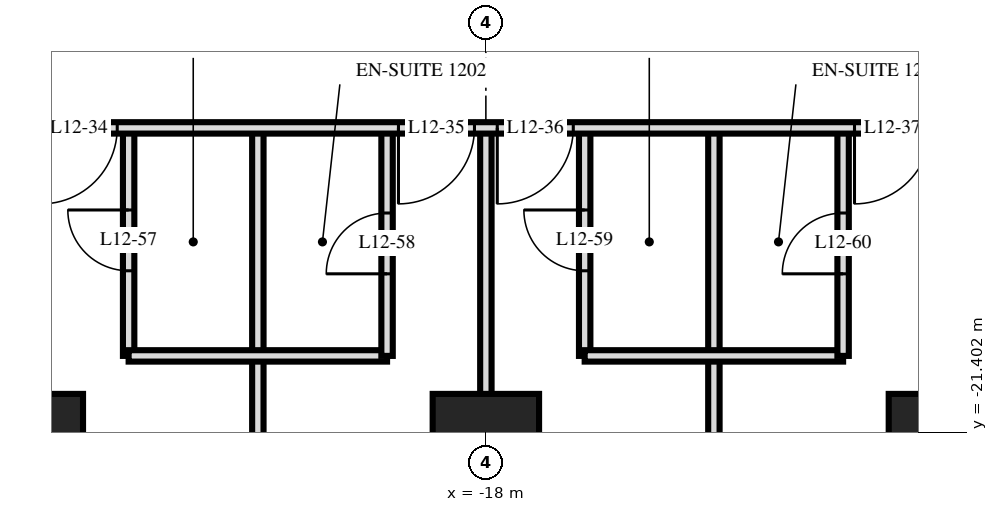
"""IFC4 building model, lengths in metres.
Left out: names, types, materials, properties, quantities, classifications, styles, units other than length and angle.
Written with IfcOpenShell. Run it as: python <this file> out.ifc"""

import sys

from ifc_helpers import new_model, si_unit, direction, frame, frame_2d, origin, origin_2d, place, context, subcontext, project, spatial, rectangle, extrude, element, fill, save


model = new_model("IFC4")
c1 = context("Model", 3, precision=1e-05, world=origin(), true_north=direction((0.0, 1.0)))
c2 = subcontext(c1, "Body", "Model", "MODEL_VIEW")
j1 = project(units=[si_unit("LENGTHUNIT", "METRE"), si_unit("PLANEANGLEUNIT", "RADIAN")], contexts=[c1])
p1 = place(None, origin())
s1 = spatial("IfcSite", under=j1, at=p1, CompositionType="ELEMENT")
p2 = place(p1, origin())
s2 = spatial("IfcBuilding", under=s1, at=p2, CompositionType="ELEMENT")
p3 = place(p2, frame((0.0, 0.0, 52.8)))
s3 = spatial("IfcBuildingStorey", under=s2, at=p3, CompositionType="ELEMENT", Elevation=52.8)
for number, where, z_axis, x_axis in (
    (1, (-24.0, -21.6, 0.0), (0.0, 0.0, 1.0), (1.0, 0.0, 0.0)),
    (2, (-18.0, -21.6, 0.0), (0.0, 0.0, 1.0), (1.0, 0.0, 0.0)),
    (3, (-12.0, -21.6, 0.0), (0.0, 0.0, 1.0), (1.0, 0.0, 0.0)),
):
    element("IfcColumn", number, at=place(p3, frame(where, z_axis=z_axis, x_axis=x_axis)), inside=s3, PredefinedType="COLUMN", context=c2, shape_type="SweptSolid", body=[
        extrude(rectangle(XDim=1.4, YDim=1.4, at=origin_2d()), origin(), (0.0, 0.0, 1.0), 3.6),
    ])
p4 = place(p3, frame((-13.3, -20.4, 0.0), z_axis=(0.0, 0.0, 1.0), x_axis=(0.0, 1.0, 0.0)))
e4 = element("IfcWall", 4, at=p4, inside=s3, PredefinedType="PARTITIONING", context=c2, shape_type="SweptSolid", body=[
    extrude(rectangle(XDim=3.0, YDim=0.15, at=frame_2d((1.5, 0.0))), origin(), (0.0, 0.0, 1.0), 3.32),
])
p5 = place(p4, frame((1.08, 0.0, 0.0)))
e5 = element("IfcOpeningElement", 5, at=p5, cuts=e4, PredefinedType="OPENING", context=c2, shape_type="SweptSolid", body=[
    extrude(rectangle(XDim=0.8, YDim=2.1, at=frame_2d((0.4, 1.05))), frame((0.0, 0.085, 0.0), z_axis=(0.0, -1.0, 0.0), x_axis=(1.0, 0.0, 0.0)), (0.0, 0.0, 1.0), 0.17),
])
p6 = place(p3, frame((-15.0, -29.22, 0.0), z_axis=(0.0, 0.0, 1.0), x_axis=(0.0, 1.0, 0.0)))
e6 = element("IfcWall", 6, at=p6, inside=s3, PredefinedType="PARTITIONING", context=c2, shape_type="SweptSolid", body=[
    extrude(rectangle(XDim=11.82, YDim=0.15, at=frame_2d((5.91, 0.0))), origin(), (0.0, 0.0, 1.0), 3.32),
])
p7 = place(p3, frame((-16.7, -20.4, 0.0), z_axis=(0.0, 0.0, 1.0), x_axis=(0.0, 1.0, 0.0)))
e7 = element("IfcWall", 7, at=p7, inside=s3, PredefinedType="PARTITIONING", context=c2, shape_type="SweptSolid", body=[
    extrude(rectangle(XDim=3.0, YDim=0.15, at=frame_2d((1.5, 0.0))), origin(), (0.0, 0.0, 1.0), 3.32),
])
p8 = place(p7, frame((1.12, 0.0, 0.0)))
e8 = element("IfcOpeningElement", 8, at=p8, cuts=e7, PredefinedType="OPENING", context=c2, shape_type="SweptSolid", body=[
    extrude(rectangle(XDim=0.8, YDim=2.1, at=frame_2d((0.4, 1.05))), frame((0.0, 0.085, 0.0), z_axis=(0.0, -1.0, 0.0), x_axis=(1.0, 0.0, 0.0)), (0.0, 0.0, 1.0), 0.17),
])
p9 = place(p3, frame((-18.0, -29.22, 0.0), z_axis=(0.0, 0.0, 1.0), x_axis=(0.0, 1.0, 0.0)))
e9 = element("IfcWall", 9, at=p9, inside=s3, PredefinedType="PARTITIONING", context=c2, shape_type="SweptSolid", body=[
    extrude(rectangle(XDim=11.82, YDim=0.15, at=frame_2d((5.91, 0.0))), origin(), (0.0, 0.0, 1.0), 3.32),
])
p10 = place(p3, frame((-19.3, -20.4, 0.0), z_axis=(0.0, 0.0, 1.0), x_axis=(0.0, 1.0, 0.0)))
e10 = element("IfcWall", 10, at=p10, inside=s3, PredefinedType="PARTITIONING", context=c2, shape_type="SweptSolid", body=[
    extrude(rectangle(XDim=3.0, YDim=0.15, at=frame_2d((1.5, 0.0))), origin(), (0.0, 0.0, 1.0), 3.32),
])
p11 = place(p10, frame((1.08, 0.0, 0.0)))
e11 = element("IfcOpeningElement", 11, at=p11, cuts=e10, PredefinedType="OPENING", context=c2, shape_type="SweptSolid", body=[
    extrude(rectangle(XDim=0.8, YDim=2.1, at=frame_2d((0.4, 1.05))), frame((0.0, 0.085, 0.0), z_axis=(0.0, -1.0, 0.0), x_axis=(1.0, 0.0, 0.0)), (0.0, 0.0, 1.0), 0.17),
])
p12 = place(p3, frame((-21.0, -29.22, 0.0), z_axis=(0.0, 0.0, 1.0), x_axis=(0.0, 1.0, 0.0)))
e12 = element("IfcWall", 12, at=p12, inside=s3, PredefinedType="PARTITIONING", context=c2, shape_type="SweptSolid", body=[
    extrude(rectangle(XDim=11.82, YDim=0.15, at=frame_2d((5.91, 0.0))), origin(), (0.0, 0.0, 1.0), 3.32),
])
p13 = place(p3, frame((-22.7, -20.4, 0.0), z_axis=(0.0, 0.0, 1.0), x_axis=(0.0, 1.0, 0.0)))
e13 = element("IfcWall", 13, at=p13, inside=s3, PredefinedType="PARTITIONING", context=c2, shape_type="SweptSolid", body=[
    extrude(rectangle(XDim=3.0, YDim=0.15, at=frame_2d((1.5, 0.0))), origin(), (0.0, 0.0, 1.0), 3.32),
])
p14 = place(p13, frame((1.12, 0.0, 0.0)))
e14 = element("IfcOpeningElement", 14, at=p14, cuts=e13, PredefinedType="OPENING", context=c2, shape_type="SweptSolid", body=[
    extrude(rectangle(XDim=0.8, YDim=2.1, at=frame_2d((0.4, 1.05))), frame((0.0, 0.085, 0.0), z_axis=(0.0, -1.0, 0.0), x_axis=(1.0, 0.0, 0.0)), (0.0, 0.0, 1.0), 0.17),
])
for number, where, z_axis, x_axis in (
    (15, (-22.7, -20.4, 0.0), (0.0, 0.0, 1.0), (1.0, 0.0, 0.0)),
    (16, (-16.7, -20.4, 0.0), (0.0, 0.0, 1.0), (1.0, 0.0, 0.0)),
):
    element("IfcWall", number, at=place(p3, frame(where, z_axis=z_axis, x_axis=x_axis)), inside=s3, PredefinedType="PARTITIONING", context=c2, shape_type="SweptSolid", body=[
        extrude(rectangle(XDim=3.4, YDim=0.15, at=frame_2d((1.7, 0.0))), origin(), (0.0, 0.0, 1.0), 3.32),
    ])
p15 = place(p3, frame((-33.12, -17.4, 0.0), z_axis=(0.0, 0.0, 1.0), x_axis=(1.0, 0.0, 0.0)))
e17 = element("IfcWall", 17, at=p15, inside=s3, PredefinedType="PARTITIONING", context=c2, shape_type="SweptSolid", body=[
    extrude(rectangle(XDim=66.24, YDim=0.15, at=frame_2d((33.12, 0.0))), origin(), (0.0, 0.0, 1.0), 3.32),
])
p16 = place(p15, frame((9.27, 0.0, 0.0)))
e18 = element("IfcOpeningElement", 18, at=p16, cuts=e17, PredefinedType="OPENING", context=c2, shape_type="SweptSolid", body=[
    extrude(rectangle(XDim=1.0, YDim=2.1, at=frame_2d((0.5, 1.05))), frame((0.0, 0.085, 0.0), z_axis=(0.0, -1.0, 0.0), x_axis=(1.0, 0.0, 0.0)), (0.0, 0.0, 1.0), 0.17),
])
p17 = place(p15, frame((13.97, 0.0, 0.0)))
e19 = element("IfcOpeningElement", 19, at=p17, cuts=e17, PredefinedType="OPENING", context=c2, shape_type="SweptSolid", body=[
    extrude(rectangle(XDim=1.0, YDim=2.1, at=frame_2d((0.5, 1.05))), frame((0.0, 0.085, 0.0), z_axis=(0.0, -1.0, 0.0), x_axis=(1.0, 0.0, 0.0)), (0.0, 0.0, 1.0), 0.17),
])
p18 = place(p15, frame((15.27, 0.0, 0.0)))
e20 = element("IfcOpeningElement", 20, at=p18, cuts=e17, PredefinedType="OPENING", context=c2, shape_type="SweptSolid", body=[
    extrude(rectangle(XDim=1.0, YDim=2.1, at=frame_2d((0.5, 1.05))), frame((0.0, 0.085, 0.0), z_axis=(0.0, -1.0, 0.0), x_axis=(1.0, 0.0, 0.0)), (0.0, 0.0, 1.0), 0.17),
])
p19 = place(p15, frame((19.97, 0.0, 0.0)))
e21 = element("IfcOpeningElement", 21, at=p19, cuts=e17, PredefinedType="OPENING", context=c2, shape_type="SweptSolid", body=[
    extrude(rectangle(XDim=1.0, YDim=2.1, at=frame_2d((0.5, 1.05))), frame((0.0, 0.085, 0.0), z_axis=(0.0, -1.0, 0.0), x_axis=(1.0, 0.0, 0.0)), (0.0, 0.0, 1.0), 0.17),
])
p20 = place(p15, frame((22.27, 0.0, 0.0)))
e22 = element("IfcOpeningElement", 22, at=p20, cuts=e17, PredefinedType="OPENING", context=c2, shape_type="SweptSolid", body=[
    extrude(rectangle(XDim=1.0, YDim=2.1, at=frame_2d((0.5, 1.05))), frame((0.0, 0.085, 0.0), z_axis=(0.0, -1.0, 0.0), x_axis=(1.0, 0.0, 0.0)), (0.0, 0.0, 1.0), 0.17),
])
p21 = place(p15, frame((28.97, 0.0, 0.0)))
e23 = element("IfcOpeningElement", 23, at=p21, cuts=e17, PredefinedType="OPENING", context=c2, shape_type="SweptSolid", body=[
    extrude(rectangle(XDim=1.0, YDim=2.1, at=frame_2d((0.5, 1.05))), frame((0.0, 0.085, 0.0), z_axis=(0.0, -1.0, 0.0), x_axis=(1.0, 0.0, 0.0)), (0.0, 0.0, 1.0), 0.17),
])
p22 = place(p15, frame((30.27, 0.0, 0.0)))
e24 = element("IfcOpeningElement", 24, at=p22, cuts=e17, PredefinedType="OPENING", context=c2, shape_type="SweptSolid", body=[
    extrude(rectangle(XDim=1.0, YDim=2.1, at=frame_2d((0.5, 1.05))), frame((0.0, 0.085, 0.0), z_axis=(0.0, -1.0, 0.0), x_axis=(1.0, 0.0, 0.0)), (0.0, 0.0, 1.0), 0.17),
])
p23 = place(p15, frame((34.97, 0.0, 0.0)))
e25 = element("IfcOpeningElement", 25, at=p23, cuts=e17, PredefinedType="OPENING", context=c2, shape_type="SweptSolid", body=[
    extrude(rectangle(XDim=1.0, YDim=2.1, at=frame_2d((0.5, 1.05))), frame((0.0, 0.085, 0.0), z_axis=(0.0, -1.0, 0.0), x_axis=(1.0, 0.0, 0.0)), (0.0, 0.0, 1.0), 0.17),
])
p24 = place(p15, frame((36.27, 0.0, 0.0)))
e26 = element("IfcOpeningElement", 26, at=p24, cuts=e17, PredefinedType="OPENING", context=c2, shape_type="SweptSolid", body=[
    extrude(rectangle(XDim=1.0, YDim=2.1, at=frame_2d((0.5, 1.05))), frame((0.0, 0.085, 0.0), z_axis=(0.0, -1.0, 0.0), x_axis=(1.0, 0.0, 0.0)), (0.0, 0.0, 1.0), 0.17),
])
p25 = place(p15, frame((39.82, 0.0, 0.0)))
e27 = element("IfcOpeningElement", 27, at=p25, cuts=e17, PredefinedType="OPENING", context=c2, shape_type="SweptSolid", body=[
    extrude(rectangle(XDim=1.0, YDim=2.1, at=frame_2d((0.5, 1.05))), frame((0.0, 0.085, 0.0), z_axis=(0.0, -1.0, 0.0), x_axis=(1.0, 0.0, 0.0)), (0.0, 0.0, 1.0), 0.17),
])
p26 = place(p15, frame((51.27, 0.0, 0.0)))
e28 = element("IfcOpeningElement", 28, at=p26, cuts=e17, PredefinedType="OPENING", context=c2, shape_type="SweptSolid", body=[
    extrude(rectangle(XDim=1.0, YDim=2.1, at=frame_2d((0.5, 1.05))), frame((0.0, 0.085, 0.0), z_axis=(0.0, -1.0, 0.0), x_axis=(1.0, 0.0, 0.0)), (0.0, 0.0, 1.0), 0.17),
])
p27 = place(p15, frame((4.42, 0.0, 0.0)))
e29 = element("IfcOpeningElement", 29, at=p27, cuts=e17, PredefinedType="OPENING", context=c2, shape_type="SweptSolid", body=[
    extrude(rectangle(XDim=1.0, YDim=2.1, at=frame_2d((0.5, 1.05))), frame((0.0, 0.085, 0.0), z_axis=(0.0, -1.0, 0.0), x_axis=(1.0, 0.0, 0.0)), (0.0, 0.0, 1.0), 0.17),
])
p28 = place(p15, frame((54.82, 0.0, 0.0)))
e30 = element("IfcOpeningElement", 30, at=p28, cuts=e17, PredefinedType="OPENING", context=c2, shape_type="SweptSolid", body=[
    extrude(rectangle(XDim=1.0, YDim=2.1, at=frame_2d((0.5, 1.05))), frame((0.0, 0.085, 0.0), z_axis=(0.0, -1.0, 0.0), x_axis=(1.0, 0.0, 0.0)), (0.0, 0.0, 1.0), 0.17),
])
p29 = place(p16, frame((0.5, 0.0, 0.0), z_axis=(0.0, 0.0, 1.0), x_axis=(-1.0, 0.0, 0.0)))
e31 = element("IfcDoor", 31, at=p29, inside=s3, OperationType="SINGLE_SWING_LEFT", PredefinedType="DOOR", context=c2, shape_type="SweptSolid", body=[
    extrude(rectangle(XDim=1.0, YDim=2.1, at=frame_2d((0.0, 1.05))), frame((0.0, -0.025, 0.0), z_axis=(0.0, 1.0, 0.0), x_axis=(-1.0, 0.0, 0.0)), (0.0, 0.0, 1.0), 0.05),
])
fill(e18, e31)
p30 = place(p17, frame((0.5, 0.0, 0.0), z_axis=(0.0, 0.0, 1.0), x_axis=(-1.0, 0.0, 0.0)))
e32 = element("IfcDoor", 32, at=p30, inside=s3, OperationType="SINGLE_SWING_LEFT", PredefinedType="DOOR", context=c2, shape_type="SweptSolid", body=[
    extrude(rectangle(XDim=1.0, YDim=2.1, at=frame_2d((0.0, 1.05))), frame((0.0, -0.025, 0.0), z_axis=(0.0, 1.0, 0.0), x_axis=(-1.0, 0.0, 0.0)), (0.0, 0.0, 1.0), 0.05),
])
fill(e19, e32)
p31 = place(p18, frame((0.5, 0.0, 0.0), z_axis=(0.0, 0.0, 1.0), x_axis=(-1.0, 0.0, 0.0)))
e33 = element("IfcDoor", 33, at=p31, inside=s3, OperationType="SINGLE_SWING_LEFT", PredefinedType="DOOR", context=c2, shape_type="SweptSolid", body=[
    extrude(rectangle(XDim=1.0, YDim=2.1, at=frame_2d((0.0, 1.05))), frame((0.0, -0.025, 0.0), z_axis=(0.0, 1.0, 0.0), x_axis=(-1.0, 0.0, 0.0)), (0.0, 0.0, 1.0), 0.05),
])
fill(e20, e33)
p32 = place(p19, frame((0.5, 0.0, 0.0), z_axis=(0.0, 0.0, 1.0), x_axis=(-1.0, 0.0, 0.0)))
e34 = element("IfcDoor", 34, at=p32, inside=s3, OperationType="SINGLE_SWING_LEFT", PredefinedType="DOOR", context=c2, shape_type="SweptSolid", body=[
    extrude(rectangle(XDim=1.0, YDim=2.1, at=frame_2d((0.0, 1.05))), frame((0.0, -0.025, 0.0), z_axis=(0.0, 1.0, 0.0), x_axis=(-1.0, 0.0, 0.0)), (0.0, 0.0, 1.0), 0.05),
])
fill(e21, e34)
p33 = place(p14, origin())
e35 = element("IfcDoor", 35, at=p33, inside=s3, OperationType="SINGLE_SWING_LEFT", PredefinedType="DOOR", context=c2, shape_type="SweptSolid", body=[
    extrude(rectangle(XDim=0.8, YDim=2.1, at=frame_2d((0.4, 1.05))), frame((0.0, 0.025, 0.0), z_axis=(0.0, -1.0, 0.0), x_axis=(1.0, 0.0, 0.0)), (0.0, 0.0, 1.0), 0.05),
])
fill(e14, e35)
p34 = place(p11, origin())
e36 = element("IfcDoor", 36, at=p34, inside=s3, OperationType="SINGLE_SWING_RIGHT", PredefinedType="DOOR", context=c2, shape_type="SweptSolid", body=[
    extrude(rectangle(XDim=0.8, YDim=2.1, at=frame_2d((0.4, 1.05))), frame((0.0, 0.025, 0.0), z_axis=(0.0, -1.0, 0.0), x_axis=(1.0, 0.0, 0.0)), (0.0, 0.0, 1.0), 0.05),
])
fill(e11, e36)
p35 = place(p8, origin())
e37 = element("IfcDoor", 37, at=p35, inside=s3, OperationType="SINGLE_SWING_LEFT", PredefinedType="DOOR", context=c2, shape_type="SweptSolid", body=[
    extrude(rectangle(XDim=0.8, YDim=2.1, at=frame_2d((0.4, 1.05))), frame((0.0, 0.025, 0.0), z_axis=(0.0, -1.0, 0.0), x_axis=(1.0, 0.0, 0.0)), (0.0, 0.0, 1.0), 0.05),
])
fill(e8, e37)
p36 = place(p5, origin())
e38 = element("IfcDoor", 38, at=p36, inside=s3, OperationType="SINGLE_SWING_RIGHT", PredefinedType="DOOR", context=c2, shape_type="SweptSolid", body=[
    extrude(rectangle(XDim=0.8, YDim=2.1, at=frame_2d((0.4, 1.05))), frame((0.0, 0.025, 0.0), z_axis=(0.0, -1.0, 0.0), x_axis=(1.0, 0.0, 0.0)), (0.0, 0.0, 1.0), 0.05),
])
fill(e5, e38)
save(model, sys.argv[1])
